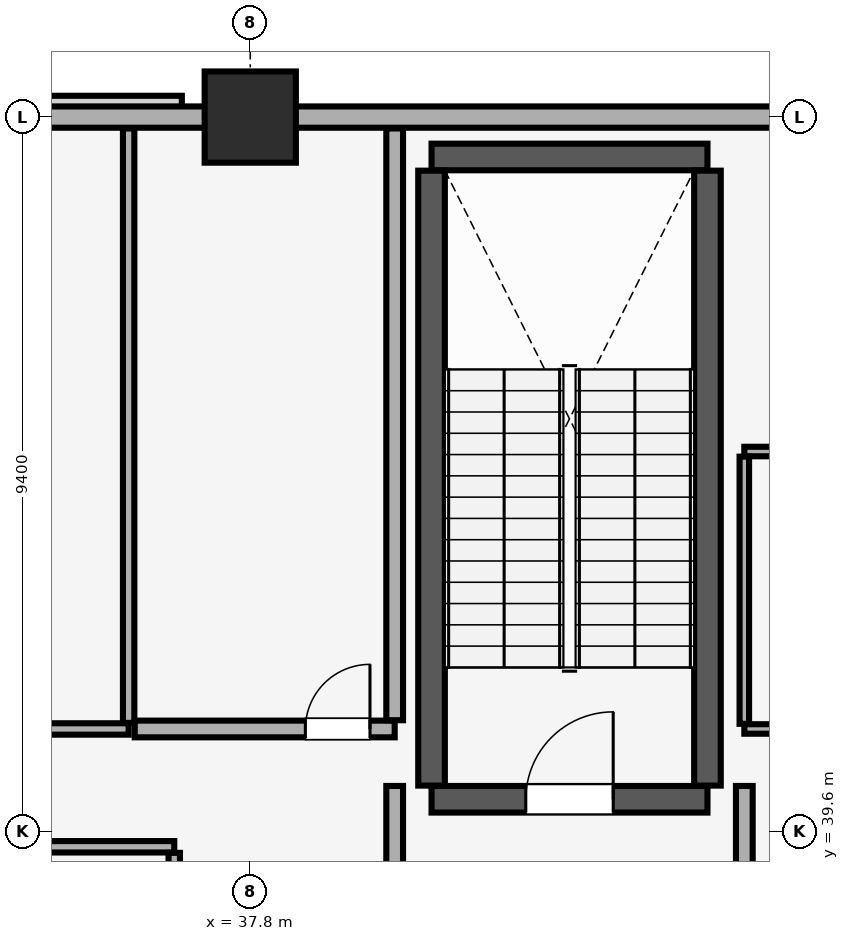
"""IFC4 building model, lengths in metres.
Left out: names, types, materials, properties, quantities, classifications, styles, units other than length and angle.
Written with IfcOpenShell. Run it as: python <this file> out.ifc"""

import sys

from ifc_helpers import new_model, si_unit, direction, frame, frame_2d, origin, origin_2d, place, context, subcontext, project, spatial, rectangle, extrude, element, fill, save


model = new_model("IFC4")
c1 = context("Model", 3, precision=1e-05, world=origin(), true_north=direction((0.0, 1.0)))
c2 = subcontext(c1, "Body", "Model", "MODEL_VIEW")
j1 = project(units=[si_unit("LENGTHUNIT", "METRE"), si_unit("PLANEANGLEUNIT", "RADIAN")], contexts=[c1])
p1 = place(None, origin())
s1 = spatial("IfcSite", under=j1, at=p1, CompositionType="ELEMENT")
p2 = place(p1, origin())
s2 = spatial("IfcBuilding", under=s1, at=p2, CompositionType="ELEMENT")
p3 = place(p2, frame((0.0, 0.0, 184.75)))
s3 = spatial("IfcBuildingStorey", under=s2, at=p3, CompositionType="ELEMENT", Elevation=184.75)
p4 = place(p3, frame((37.8, 49.0, 0.0), z_axis=(0.0, 0.0, 1.0), x_axis=(1.0, 0.0, 0.0)))
e1 = element("IfcColumn", 1, at=p4, inside=s3, PredefinedType="COLUMN", context=c2, shape_type="SweptSolid", body=[
    extrude(rectangle(XDim=1.2, YDim=1.2, at=origin_2d()), origin(), (0.0, 0.0, 1.0), 5.16),
])
p5 = place(p3, frame((77.0, 49.0, 0.0), z_axis=(0.0, 0.0, 1.0), x_axis=(-1.0, 0.0, 0.0)))
e2 = element("IfcWall", 2, at=p5, inside=s3, PredefinedType="SOLIDWALL", context=c2, shape_type="SweptSolid", body=[
    extrude(rectangle(XDim=70.0, YDim=0.28, at=frame_2d((35.0, 0.0))), origin(), (0.0, 0.0, 1.0), 4.36),
])
p6 = place(p3, frame((40.185, 40.025, 0.0), z_axis=(0.0, 0.0, 1.0), x_axis=(1.0, 0.0, 0.0)))
e3 = element("IfcWall", 3, at=p6, inside=s3, PredefinedType="SHEAR", context=c2, shape_type="SweptSolid", body=[
    extrude(rectangle(XDim=3.63, YDim=0.35, at=frame_2d((1.815, 0.0))), origin(), (0.0, 0.0, 1.0), 5.16),
])
p7 = place(p6, frame((1.24, 0.0, 0.0)))
e4 = element("IfcOpeningElement", 4, at=p7, cuts=e3, PredefinedType="OPENING", context=c2, shape_type="SweptSolid", body=[
    extrude(rectangle(XDim=1.15, YDim=2.15, at=frame_2d((0.575, 1.075))), frame((0.0, 0.185, 0.0), z_axis=(0.0, -1.0, 0.0), x_axis=(1.0, 0.0, 0.0)), (0.0, 0.0, 1.0), 0.37),
])
p8 = place(p3, frame((40.185, 48.475, 0.0), z_axis=(0.0, 0.0, 1.0), x_axis=(1.0, 0.0, 0.0)))
e5 = element("IfcWall", 5, at=p8, inside=s3, PredefinedType="SHEAR", context=c2, shape_type="SweptSolid", body=[
    extrude(rectangle(XDim=3.63, YDim=0.35, at=frame_2d((1.815, 0.0))), origin(), (0.0, 0.0, 1.0), 5.16),
])
for number, where, z_axis, x_axis in (
    (6, (40.185, 40.205, 0.0), (0.0, 0.0, 1.0), (0.0, 1.0, 0.0)),
    (7, (43.815, 40.205, 0.0), (0.0, 0.0, 1.0), (0.0, 1.0, 0.0)),
):
    element("IfcWall", number, at=place(p3, frame(where, z_axis=z_axis, x_axis=x_axis)), inside=s3, PredefinedType="SHEAR", context=c2, shape_type="SweptSolid", body=[
        extrude(rectangle(XDim=8.09, YDim=0.35, at=frame_2d((4.045, 0.0))), origin(), (0.0, 0.0, 1.0), 5.16),
    ])
for number, where, z_axis, x_axis in (
    (8, (39.7, 34.415, 0.0), (0.0, 0.0, 1.0), (0.0, 1.0, 0.0)),
    (9, (44.3, 34.415, 0.0), (0.0, 0.0, 1.0), (0.0, 1.0, 0.0)),
):
    element("IfcWall", number, at=place(p3, frame(where, z_axis=z_axis, x_axis=x_axis)), inside=s3, PredefinedType="PARTITIONING", context=c2, shape_type="SweptSolid", body=[
        extrude(rectangle(XDim=5.785, YDim=0.22, at=frame_2d((2.893, 0.0))), origin(), (0.0, 0.0, 1.0), 5.16),
    ])
p9 = place(p3, frame((31.6, 39.4, 0.0), z_axis=(0.0, 0.0, 1.0), x_axis=(1.0, 0.0, 0.0)))
e10 = element("IfcWall", 10, at=p9, inside=s3, PredefinedType="PARTITIONING", context=c2, shape_type="SweptSolid", body=[
    extrude(rectangle(XDim=5.2, YDim=0.15, at=frame_2d((2.6, 0.0))), origin(), (0.0, 0.0, 1.0), 5.16),
])
p10 = place(p3, frame((36.8, 34.38, 0.0), z_axis=(0.0, 0.0, 1.0), x_axis=(0.0, 1.0, 0.0)))
e11 = element("IfcWall", 11, at=p10, inside=s3, PredefinedType="PARTITIONING", context=c2, shape_type="SweptSolid", body=[
    extrude(rectangle(XDim=4.94, YDim=0.15, at=frame_2d((2.47, 0.0))), origin(), (0.0, 0.0, 1.0), 5.16),
])
p11 = place(p3, frame((32.88, 40.95, 0.0), z_axis=(0.0, 0.0, 1.0), x_axis=(1.0, 0.0, 0.0)))
e12 = element("IfcWall", 12, at=p11, inside=s3, PredefinedType="PARTITIONING", context=c2, shape_type="SweptSolid", body=[
    extrude(rectangle(XDim=3.32, YDim=0.15, at=frame_2d((1.66, 0.0))), origin(), (0.0, 0.0, 1.0), 5.16),
])
p12 = place(p11, frame((1.12, 0.0, 0.0)))
e13 = element("IfcOpeningElement", 13, at=p12, cuts=e12, PredefinedType="OPENING", context=c2, shape_type="SweptSolid", body=[
    extrude(rectangle(XDim=1.0, YDim=2.15, at=frame_2d((0.5, 1.075))), frame((0.0, 0.085, 0.0), z_axis=(0.0, -1.0, 0.0), x_axis=(1.0, 0.0, 0.0)), (0.0, 0.0, 1.0), 0.17),
])
p13 = place(p3, frame((36.2, 41.03, 0.0), z_axis=(0.0, 0.0, 1.0), x_axis=(0.0, 1.0, 0.0)))
e14 = element("IfcWall", 14, at=p13, inside=s3, PredefinedType="PARTITIONING", context=c2, shape_type="SweptSolid", body=[
    extrude(rectangle(XDim=7.82, YDim=0.15, at=frame_2d((3.91, 0.0))), origin(), (0.0, 0.0, 1.0), 5.16),
])
p14 = place(p3, frame((36.28, 40.95, 0.0), z_axis=(0.0, 0.0, 1.0), x_axis=(1.0, 0.0, 0.0)))
e15 = element("IfcWall", 15, at=p14, inside=s3, PredefinedType="PARTITIONING", context=c2, shape_type="SweptSolid", body=[
    extrude(rectangle(XDim=3.42, YDim=0.22, at=frame_2d((1.71, 0.0))), origin(), (0.0, 0.0, 1.0), 5.16),
])
p15 = place(p14, frame((2.245, 0.0, 0.0)))
e16 = element("IfcOpeningElement", 16, at=p15, cuts=e15, PredefinedType="OPENING", context=c2, shape_type="SweptSolid", body=[
    extrude(rectangle(XDim=0.85, YDim=2.1, at=frame_2d((0.425, 1.05))), frame((0.0, 0.12, 0.0), z_axis=(0.0, -1.0, 0.0), x_axis=(1.0, 0.0, 0.0)), (0.0, 0.0, 1.0), 0.24),
])
p16 = place(p3, frame((39.7, 41.065, 0.0), z_axis=(0.0, 0.0, 1.0), x_axis=(0.0, 1.0, 0.0)))
e17 = element("IfcWall", 17, at=p16, inside=s3, PredefinedType="PARTITIONING", context=c2, shape_type="SweptSolid", body=[
    extrude(rectangle(XDim=7.785, YDim=0.22, at=frame_2d((3.893, 0.0))), origin(), (0.0, 0.0, 1.0), 5.16),
])
p17 = place(p3, frame((44.3, 40.95, 0.0), z_axis=(0.0, 0.0, 1.0), x_axis=(1.0, 0.0, 0.0)))
e18 = element("IfcWall", 18, at=p17, inside=s3, PredefinedType="PARTITIONING", context=c2, shape_type="SweptSolid", body=[
    extrude(rectangle(XDim=4.6, YDim=0.125, at=frame_2d((2.3, 0.0))), origin(), (0.0, 0.0, 1.0), 5.16),
])
p18 = place(p17, frame((2.85, 0.0, 0.0)))
e19 = element("IfcOpeningElement", 19, at=p18, cuts=e18, PredefinedType="OPENING", context=c2, shape_type="SweptSolid", body=[
    extrude(rectangle(XDim=0.9, YDim=2.1, at=frame_2d((0.45, 1.05))), frame((0.0, 0.073, 0.0), z_axis=(0.0, -1.0, 0.0), x_axis=(1.0, 0.0, 0.0)), (0.0, 0.0, 1.0), 0.145),
])
p19 = place(p3, frame((44.3, 44.6, 0.0), z_axis=(0.0, 0.0, 1.0), x_axis=(1.0, 0.0, 0.0)))
e20 = element("IfcWall", 20, at=p19, inside=s3, PredefinedType="PARTITIONING", context=c2, shape_type="SweptSolid", body=[
    extrude(rectangle(XDim=4.6, YDim=0.125, at=frame_2d((2.3, 0.0))), origin(), (0.0, 0.0, 1.0), 5.16),
])
p20 = place(p3, frame((44.3, 41.018, 0.0), z_axis=(0.0, 0.0, 1.0), x_axis=(0.0, 1.0, 0.0)))
e21 = element("IfcWall", 21, at=p20, inside=s3, PredefinedType="PARTITIONING", context=c2, shape_type="SweptSolid", body=[
    extrude(rectangle(XDim=3.515, YDim=0.125, at=frame_2d((1.757, 0.0))), origin(), (0.0, 0.0, 1.0), 5.16),
])
p21 = place(p7, origin())
e22 = element("IfcDoor", 22, at=p21, inside=s3, OperationType="SINGLE_SWING_RIGHT", PredefinedType="DOOR", context=c2, shape_type="SweptSolid", body=[
    extrude(rectangle(XDim=1.15, YDim=2.15, at=frame_2d((0.575, 1.075))), frame((0.0, 0.025, 0.0), z_axis=(0.0, -1.0, 0.0), x_axis=(1.0, 0.0, 0.0)), (0.0, 0.0, 1.0), 0.05),
])
fill(e4, e22)
p22 = place(p15, origin())
e23 = element("IfcDoor", 23, at=p22, inside=s3, OperationType="SINGLE_SWING_RIGHT", PredefinedType="DOOR", context=c2, shape_type="SweptSolid", body=[
    extrude(rectangle(XDim=0.85, YDim=2.1, at=frame_2d((0.425, 1.05))), frame((0.0, 0.025, 0.0), z_axis=(0.0, -1.0, 0.0), x_axis=(1.0, 0.0, 0.0)), (0.0, 0.0, 1.0), 0.05),
])
fill(e16, e23)
save(model, sys.argv[1])
